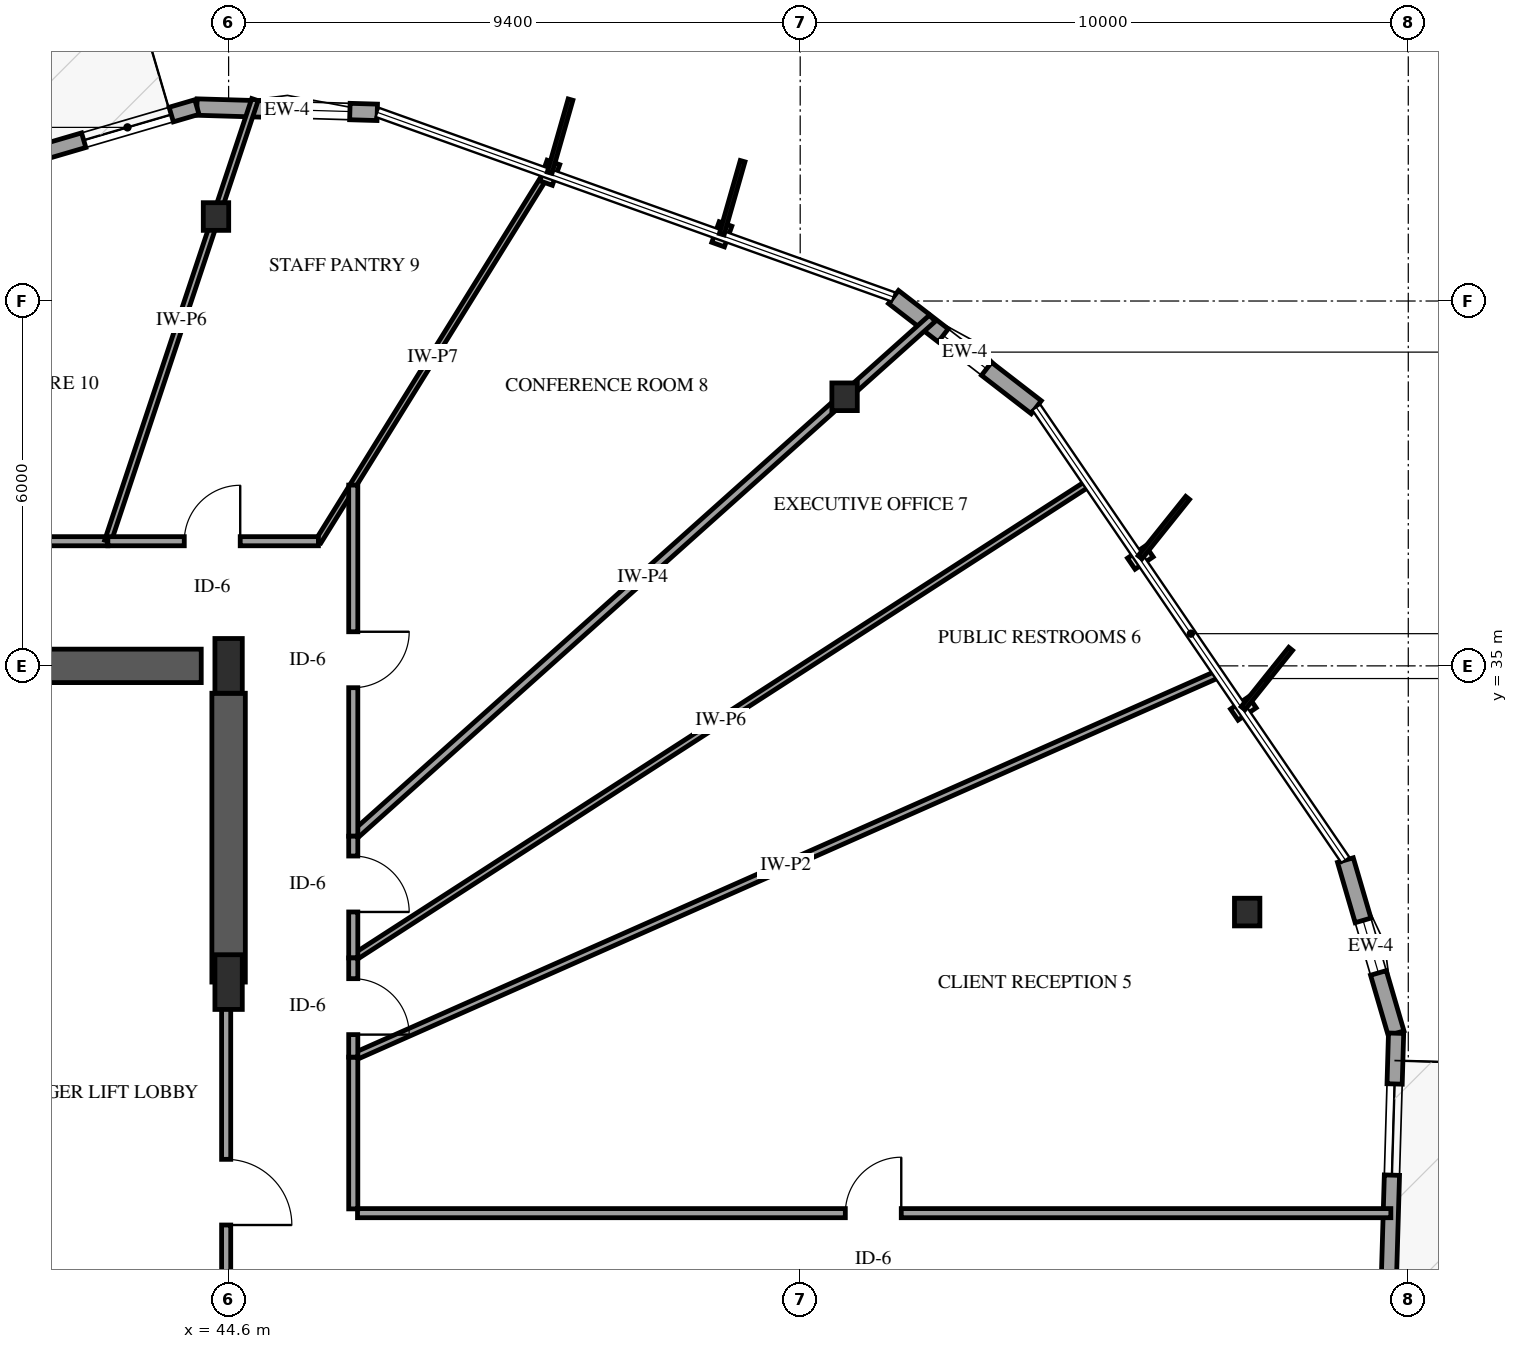
"""IFC4 building model, lengths in metres.
Left out: names, types, materials, properties, quantities, classifications, styles, units other than length and angle.
Written with IfcOpenShell. Run it as: python <this file> out.ifc"""

import sys

from ifc_helpers import new_model, si_unit, direction, frame, frame_2d, origin, origin_2d, place, context, subcontext, project, spatial, rectangle, i_section, extrude, element, fill, save


model = new_model("IFC4")
c1 = context("Model", 3, precision=1e-05, world=origin(), true_north=direction((0.0, 1.0)))
c2 = subcontext(c1, "Body", "Model", "MODEL_VIEW")
j1 = project(units=[si_unit("LENGTHUNIT", "METRE"), si_unit("PLANEANGLEUNIT", "RADIAN")], contexts=[c1])
p1 = place(None, origin())
s1 = spatial("IfcSite", under=j1, at=p1, CompositionType="ELEMENT")
p2 = place(p1, origin())
s2 = spatial("IfcBuilding", under=s1, at=p2, CompositionType="ELEMENT")
p3 = place(p2, frame((0.0, 0.0, 91.3)))
s3 = spatial("IfcBuildingStorey", under=s2, at=p3, CompositionType="ELEMENT", Elevation=91.3)
p4 = place(p3, frame((41.3, 35.0, 0.0), z_axis=(0.0, 0.0, 1.0), x_axis=(1.0, 0.0, 0.0)))
e1 = element("IfcWall", 1, at=p4, inside=s3, PredefinedType="SHEAR", context=c2, shape_type="SweptSolid", body=[
    extrude(rectangle(XDim=2.85, YDim=0.55, at=frame_2d((1.425, 0.0))), origin(), (0.0, 0.0, 1.0), 3.9),
])
p5 = place(p3, frame((44.6, 29.8, 0.0), z_axis=(0.0, 0.0, 1.0), x_axis=(0.0, 1.0, 0.0)))
e2 = element("IfcWall", 2, at=p5, inside=s3, PredefinedType="SHEAR", context=c2, shape_type="SweptSolid", body=[
    extrude(rectangle(XDim=4.75, YDim=0.55, at=frame_2d((2.375, 0.0))), origin(), (0.0, 0.0, 1.0), 3.9),
])
for number, where, z_axis, x_axis in (
    (3, (44.6, 29.8, 0.0), (0.0, 0.0, 1.0), (1.0, 0.0, 0.0)),
    (4, (44.6, 35.0, 0.0), (0.0, 0.0, 1.0), (1.0, 0.0, 0.0)),
):
    element("IfcColumn", number, at=place(p3, frame(where, z_axis=z_axis, x_axis=x_axis)), inside=s3, PredefinedType="PILASTER", context=c2, shape_type="SweptSolid", body=[
        extrude(rectangle(XDim=0.45, YDim=0.9, at=origin_2d()), origin(), (0.0, 0.0, 1.0), 3.9),
    ])
for number, where, z_axis, x_axis in (
    (5, (61.351, 30.951, 0.0), (0.0, 0.0, 1.0), (1.0, 0.0, 0.0)),
    (6, (54.73, 39.425, 0.0), (0.0, 0.0, 1.0), (1.0, 0.0, 0.0)),
    (7, (44.393, 42.389, 0.0), (0.0, 0.0, 1.0), (1.0, 0.0, 0.0)),
):
    element("IfcColumn", number, at=place(p3, frame(where, z_axis=z_axis, x_axis=x_axis)), inside=s3, PredefinedType="COLUMN", context=c2, shape_type="SweptSolid", body=[
        extrude(i_section(OverallWidth=0.418, OverallDepth=0.455, WebThickness=0.042, FlangeThickness=0.068, FilletRadius=0.038, at=origin_2d()), origin(), (0.0, 0.0, 1.0), 3.9),
    ])
p6 = place(p3, frame((57.882, 39.253, 0.0), z_axis=(0.0, 0.0, 1.0), x_axis=(-0.791417099737, 0.611276512098, 0.0)))
e8 = element("IfcWall", 8, at=p6, inside=s3, PredefinedType="SOLIDWALL", context=c2, shape_type="SweptSolid", body=[
    extrude(rectangle(XDim=2.967, YDim=0.27, at=frame_2d((1.483, 0.0))), origin(), (0.0, 0.0, 1.0), 2.979),
])
p7 = place(p6, frame((1.033, 0.0, 0.75)))
e9 = element("IfcOpeningElement", 9, at=p7, cuts=e8, PredefinedType="OPENING", context=c2, shape_type="SweptSolid", body=[
    extrude(rectangle(XDim=0.9, YDim=1.5, at=frame_2d((0.45, 0.75))), frame((0.0, 0.145, 0.0), z_axis=(0.0, -1.0, 0.0), x_axis=(1.0, 0.0, 0.0)), (0.0, 0.0, 1.0), 0.29),
])
p8 = place(p3, frame((47.044, 44.103, 0.0), z_axis=(0.0, 0.0, 1.0), x_axis=(-0.999570736723, 0.029297479193, 0.0)))
e10 = element("IfcWall", 10, at=p8, inside=s3, PredefinedType="SOLIDWALL", context=c2, shape_type="SweptSolid", body=[
    extrude(rectangle(XDim=2.967, YDim=0.27, at=frame_2d((1.483, 0.0))), origin(), (0.0, 0.0, 1.0), 2.979),
])
p9 = place(p8, frame((0.45, 0.0, 0.75)))
e11 = element("IfcOpeningElement", 11, at=p9, cuts=e10, PredefinedType="OPENING", context=c2, shape_type="SweptSolid", body=[
    extrude(rectangle(XDim=0.9, YDim=1.5, at=frame_2d((0.45, 0.75))), frame((0.0, 0.145, 0.0), z_axis=(0.0, -1.0, 0.0), x_axis=(1.0, 0.0, 0.0)), (0.0, 0.0, 1.0), 0.29),
])
p10 = place(p3, frame((44.079, 44.19, 0.0), z_axis=(0.0, 0.0, 1.0), x_axis=(-0.959709272815, -0.28099486058, 0.0)))
e12 = element("IfcWall", 12, at=p10, inside=s3, PredefinedType="SOLIDWALL", context=c2, shape_type="SweptSolid", body=[
    extrude(rectangle(XDim=9.017, YDim=0.25, at=frame_2d((4.508, 0.0))), origin(), (0.0, 0.0, 1.0), 2.979),
])
p11 = place(p10, frame((4.008, 0.0, 0.0)))
e13 = element("IfcOpeningElement", 13, at=p11, cuts=e12, PredefinedType="OPENING", context=c2, shape_type="SweptSolid", body=[
    extrude(rectangle(XDim=1.05, YDim=2.15, at=frame_2d((0.525, 1.075))), frame((0.0, 0.135, 0.0), z_axis=(0.0, -1.0, 0.0), x_axis=(1.0, 0.0, 0.0)), (0.0, 0.0, 1.0), 0.27),
])
p12 = place(p10, frame((0.44, 0.0, 0.72)))
e14 = element("IfcOpeningElement", 14, at=p12, cuts=e12, PredefinedType="OPENING", context=c2, shape_type="SweptSolid", body=[
    extrude(rectangle(XDim=1.5, YDim=1.7, at=frame_2d((0.75, 0.85))), frame((0.0, 0.135, 0.0), z_axis=(0.0, -1.0, 0.0), x_axis=(1.0, 0.0, 0.0)), (0.0, 0.0, 1.0), 0.27),
])
p13 = place(p10, frame((5.698, 0.0, 0.72)))
e15 = element("IfcOpeningElement", 15, at=p13, cuts=e12, PredefinedType="OPENING", context=c2, shape_type="SweptSolid", body=[
    extrude(rectangle(XDim=1.5, YDim=1.7, at=frame_2d((0.75, 0.85))), frame((0.0, 0.135, 0.0), z_axis=(0.0, -1.0, 0.0), x_axis=(1.0, 0.0, 0.0)), (0.0, 0.0, 1.0), 0.27),
])
p14 = place(p3, frame((63.8, 28.959, 0.0), z_axis=(0.0, 0.0, 1.0), x_axis=(-0.280976408638, 0.959714675197, 0.0)))
e16 = element("IfcWall", 16, at=p14, inside=s3, PredefinedType="SOLIDWALL", context=c2, shape_type="SweptSolid", body=[
    extrude(rectangle(XDim=2.966, YDim=0.27, at=frame_2d((1.483, 0.0))), origin(), (0.0, 0.0, 1.0), 2.979),
])
p15 = place(p14, frame((1.033, 0.0, 0.75)))
e17 = element("IfcOpeningElement", 17, at=p15, cuts=e16, PredefinedType="OPENING", context=c2, shape_type="SweptSolid", body=[
    extrude(rectangle(XDim=0.9, YDim=1.5, at=frame_2d((0.45, 0.75))), frame((0.0, 0.145, 0.0), z_axis=(0.0, -1.0, 0.0), x_axis=(1.0, 0.0, 0.0)), (0.0, 0.0, 1.0), 0.29),
])
p16 = place(p3, frame((63.535, 19.946, 0.0), z_axis=(0.0, 0.0, 1.0), x_axis=(0.029323462977, 0.999569974799, 0.0)))
e18 = element("IfcWall", 18, at=p16, inside=s3, PredefinedType="SOLIDWALL", context=c2, shape_type="SweptSolid", body=[
    extrude(rectangle(XDim=9.017, YDim=0.25, at=frame_2d((4.508, 0.0))), origin(), (0.0, 0.0, 1.0), 2.979),
])
p17 = place(p16, frame((0.65, 0.0, 0.0)))
e19 = element("IfcOpeningElement", 19, at=p17, cuts=e18, PredefinedType="OPENING", context=c2, shape_type="SweptSolid", body=[
    extrude(rectangle(XDim=1.05, YDim=2.15, at=frame_2d((0.525, 1.075))), frame((0.0, 0.135, 0.0), z_axis=(0.0, -1.0, 0.0), x_axis=(1.0, 0.0, 0.0)), (0.0, 0.0, 1.0), 0.27),
])
p18 = place(p16, frame((6.682, 0.0, 0.72)))
e20 = element("IfcOpeningElement", 20, at=p18, cuts=e18, PredefinedType="OPENING", context=c2, shape_type="SweptSolid", body=[
    extrude(rectangle(XDim=1.5, YDim=1.7, at=frame_2d((0.75, 0.85))), frame((0.0, 0.135, 0.0), z_axis=(0.0, -1.0, 0.0), x_axis=(1.0, 0.0, 0.0)), (0.0, 0.0, 1.0), 0.27),
])
p19 = place(p3, frame((46.72, 26.0, 0.0), z_axis=(0.0, 0.0, 1.0), x_axis=(1.0, 0.0, 0.0)))
e21 = element("IfcWall", 21, at=p19, inside=s3, PredefinedType="PARTITIONING", context=c2, shape_type="SweptSolid", body=[
    extrude(rectangle(XDim=16.993, YDim=0.15, at=frame_2d((8.497, 0.0))), origin(), (0.0, 0.0, 1.0), 3.6),
])
p20 = place(p19, frame((8.022, 0.0, 0.0)))
e22 = element("IfcOpeningElement", 22, at=p20, cuts=e21, PredefinedType="OPENING", context=c2, shape_type="SweptSolid", body=[
    extrude(rectangle(XDim=0.92, YDim=2.12, at=frame_2d((0.46, 1.06))), frame((0.0, 0.085, 0.0), z_axis=(0.0, -1.0, 0.0), x_axis=(1.0, 0.0, 0.0)), (0.0, 0.0, 1.0), 0.17),
])
p21 = place(p3, frame((46.65, 28.566, 0.0), z_axis=(0.0, 0.0, 1.0), x_axis=(0.91433810275, 0.404951643853, 0.0)))
e23 = element("IfcWall", 23, at=p21, inside=s3, PredefinedType="PARTITIONING", context=c2, shape_type="SweptSolid", body=[
    extrude(rectangle(XDim=15.56, YDim=0.12, at=frame_2d((7.78, 0.0))), origin(), (0.0, 0.0, 1.0), 3.6),
])
p22 = place(p3, frame((46.65, 30.197, 0.0), z_axis=(0.0, 0.0, 1.0), x_axis=(0.840113321111, 0.542410921435, 0.0)))
e24 = element("IfcWall", 24, at=p22, inside=s3, PredefinedType="PARTITIONING", context=c2, shape_type="SweptSolid", body=[
    extrude(rectangle(XDim=14.387, YDim=0.11, at=frame_2d((7.194, 0.0))), origin(), (0.0, 0.0, 1.0), 3.6),
])
p23 = place(p3, frame((46.65, 32.199, 0.0), z_axis=(0.0, 0.0, 1.0), x_axis=(0.745379719691, 0.66664013791, 0.0)))
e25 = element("IfcWall", 25, at=p23, inside=s3, PredefinedType="PARTITIONING", context=c2, shape_type="SweptSolid", body=[
    extrude(rectangle(XDim=12.778, YDim=0.14, at=frame_2d((6.389, 0.0))), origin(), (0.0, 0.0, 1.0), 3.6),
])
p24 = place(p3, frame((34.81, 37.05, 0.0), z_axis=(0.0, 0.0, 1.0), x_axis=(1.0, 0.0, 0.0)))
e26 = element("IfcWall", 26, at=p24, inside=s3, PredefinedType="PARTITIONING", context=c2, shape_type="SweptSolid", body=[
    extrude(rectangle(XDim=7.804, YDim=0.15, at=frame_2d((3.902, 0.0))), origin(), (0.0, 0.0, 1.0), 3.6),
])
p25 = place(p24, frame((3.427, 0.0, 0.0)))
e27 = element("IfcOpeningElement", 27, at=p25, cuts=e26, PredefinedType="OPENING", context=c2, shape_type="SweptSolid", body=[
    extrude(rectangle(XDim=0.92, YDim=2.12, at=frame_2d((0.46, 1.06))), frame((0.0, 0.085, 0.0), z_axis=(0.0, -1.0, 0.0), x_axis=(1.0, 0.0, 0.0)), (0.0, 0.0, 1.0), 0.17),
])
p26 = place(p3, frame((42.614, 37.05, 0.0), z_axis=(0.0, 0.0, 1.0), x_axis=(0.316026813331, 0.948750258633, 0.0)))
e28 = element("IfcWall", 28, at=p26, inside=s3, PredefinedType="PARTITIONING", context=c2, shape_type="SweptSolid", body=[
    extrude(rectangle(XDim=7.654, YDim=0.11, at=frame_2d((3.827, 0.0))), origin(), (0.0, 0.0, 1.0), 2.895),
])
p27 = place(p3, frame((46.077, 37.05, 0.0), z_axis=(0.0, 0.0, 1.0), x_axis=(0.527246015716, 0.849712680211, 0.0)))
e29 = element("IfcWall", 29, at=p27, inside=s3, PredefinedType="PARTITIONING", context=c2, shape_type="SweptSolid", body=[
    extrude(rectangle(XDim=7.126, YDim=0.1, at=frame_2d((3.563, 0.0))), origin(), (0.0, 0.0, 1.0), 3.6),
])
p28 = place(p3, frame((44.56, 29.8, 0.0), z_axis=(0.0, 0.0, 1.0), x_axis=(0.0, -1.0, 0.0)))
e30 = element("IfcWall", 30, at=p28, inside=s3, PredefinedType="PARTITIONING", context=c2, shape_type="SweptSolid", body=[
    extrude(rectangle(XDim=6.91, YDim=0.15, at=frame_2d((3.455, 0.0))), origin(), (0.0, 0.0, 1.0), 2.64),
])
p29 = place(p28, frame((2.915, 0.0, 0.0)))
e31 = element("IfcOpeningElement", 31, at=p29, cuts=e30, PredefinedType="OPENING", context=c2, shape_type="SweptSolid", body=[
    extrude(rectangle(XDim=1.08, YDim=2.15, at=frame_2d((0.54, 1.075))), frame((0.0, 0.085, 0.0), z_axis=(0.0, -1.0, 0.0), x_axis=(1.0, 0.0, 0.0)), (0.0, 0.0, 1.0), 0.17),
])
p30 = place(p3, frame((46.65, 37.973, 0.0), z_axis=(0.0, 0.0, 1.0), x_axis=(0.0, -1.0, 0.0)))
e32 = element("IfcWall", 32, at=p30, inside=s3, PredefinedType="PARTITIONING", context=c2, shape_type="SweptSolid", body=[
    extrude(rectangle(XDim=5.774, YDim=0.15, at=frame_2d((2.887, 0.0))), origin(), (0.0, 0.0, 1.0), 3.6),
])
p31 = place(p30, frame((2.412, 0.0, 0.0)))
e33 = element("IfcOpeningElement", 33, at=p31, cuts=e32, PredefinedType="OPENING", context=c2, shape_type="SweptSolid", body=[
    extrude(rectangle(XDim=0.92, YDim=2.12, at=frame_2d((0.46, 1.06))), frame((0.0, 0.085, 0.0), z_axis=(0.0, -1.0, 0.0), x_axis=(1.0, 0.0, 0.0)), (0.0, 0.0, 1.0), 0.17),
])
p32 = place(p3, frame((42.614, 37.05, 0.0), z_axis=(0.0, 0.0, 1.0), x_axis=(1.0, 0.0, 0.0)))
e34 = element("IfcWall", 34, at=p32, inside=s3, PredefinedType="PARTITIONING", context=c2, shape_type="SweptSolid", body=[
    extrude(rectangle(XDim=3.463, YDim=0.15, at=frame_2d((1.731, 0.0))), origin(), (0.0, 0.0, 1.0), 3.6),
])
p33 = place(p32, frame((1.257, 0.0, 0.0)))
e35 = element("IfcOpeningElement", 35, at=p33, cuts=e34, PredefinedType="OPENING", context=c2, shape_type="SweptSolid", body=[
    extrude(rectangle(XDim=0.92, YDim=2.12, at=frame_2d((0.46, 1.06))), frame((0.0, 0.085, 0.0), z_axis=(0.0, -1.0, 0.0), x_axis=(1.0, 0.0, 0.0)), (0.0, 0.0, 1.0), 0.17),
])
p34 = place(p3, frame((46.65, 28.566, 0.0), z_axis=(0.0, 0.0, 1.0), x_axis=(0.0, -1.0, 0.0)))
e36 = element("IfcWall", 36, at=p34, inside=s3, PredefinedType="PARTITIONING", context=c2, shape_type="SweptSolid", body=[
    extrude(rectangle(XDim=2.496, YDim=0.15, at=frame_2d((1.248, 0.0))), origin(), (0.0, 0.0, 1.0), 3.6),
])
p35 = place(p3, frame((46.65, 32.199, 0.0), z_axis=(0.0, 0.0, 1.0), x_axis=(0.0, -1.0, 0.0)))
e37 = element("IfcWall", 37, at=p35, inside=s3, PredefinedType="PARTITIONING", context=c2, shape_type="SweptSolid", body=[
    extrude(rectangle(XDim=2.002, YDim=0.15, at=frame_2d((1.001, 0.0))), origin(), (0.0, 0.0, 1.0), 3.6),
])
p36 = place(p35, frame((0.326, 0.0, 0.0)))
e38 = element("IfcOpeningElement", 38, at=p36, cuts=e37, PredefinedType="OPENING", context=c2, shape_type="SweptSolid", body=[
    extrude(rectangle(XDim=0.92, YDim=2.12, at=frame_2d((0.46, 1.06))), frame((0.0, 0.085, 0.0), z_axis=(0.0, -1.0, 0.0), x_axis=(1.0, 0.0, 0.0)), (0.0, 0.0, 1.0), 0.17),
])
p37 = place(p3, frame((46.65, 30.197, 0.0), z_axis=(0.0, 0.0, 1.0), x_axis=(0.0, -1.0, 0.0)))
e39 = element("IfcWall", 39, at=p37, inside=s3, PredefinedType="PARTITIONING", context=c2, shape_type="SweptSolid", body=[
    extrude(rectangle(XDim=1.631, YDim=0.15, at=frame_2d((0.815, 0.0))), origin(), (0.0, 0.0, 1.0), 3.6),
])
p38 = place(p37, frame((0.341, 0.0, 0.0)))
e40 = element("IfcOpeningElement", 40, at=p38, cuts=e39, PredefinedType="OPENING", context=c2, shape_type="SweptSolid", body=[
    extrude(rectangle(XDim=0.92, YDim=2.12, at=frame_2d((0.46, 1.06))), frame((0.0, 0.085, 0.0), z_axis=(0.0, -1.0, 0.0), x_axis=(1.0, 0.0, 0.0)), (0.0, 0.0, 1.0), 0.17),
])
p39 = place(p7, origin())
e41 = element("IfcWindow", 41, at=p39, inside=s3, PartitioningType="SINGLE_PANEL", PredefinedType="WINDOW", context=c2, shape_type="SweptSolid", body=[
    extrude(rectangle(XDim=0.9, YDim=1.5, at=frame_2d((0.45, 0.75))), frame((0.0, 0.03, 0.0), z_axis=(0.0, -1.0, 0.0), x_axis=(1.0, 0.0, 0.0)), (0.0, 0.0, 1.0), 0.06),
])
fill(e9, e41)
p40 = place(p9, origin())
e42 = element("IfcWindow", 42, at=p40, inside=s3, PartitioningType="SINGLE_PANEL", PredefinedType="WINDOW", context=c2, shape_type="SweptSolid", body=[
    extrude(rectangle(XDim=0.9, YDim=1.5, at=frame_2d((0.45, 0.75))), frame((0.0, 0.03, 0.0), z_axis=(0.0, -1.0, 0.0), x_axis=(1.0, 0.0, 0.0)), (0.0, 0.0, 1.0), 0.06),
])
fill(e11, e42)
p41 = place(p12, origin())
e43 = element("IfcWindow", 43, at=p41, inside=s3, PartitioningType="SINGLE_PANEL", PredefinedType="WINDOW", context=c2, shape_type="SweptSolid", body=[
    extrude(rectangle(XDim=1.5, YDim=1.7, at=frame_2d((0.75, 0.85))), frame((0.0, 0.03, 0.0), z_axis=(0.0, -1.0, 0.0), x_axis=(1.0, 0.0, 0.0)), (0.0, 0.0, 1.0), 0.06),
])
fill(e14, e43)
p42 = place(p15, origin())
e44 = element("IfcWindow", 44, at=p42, inside=s3, PartitioningType="SINGLE_PANEL", PredefinedType="WINDOW", context=c2, shape_type="SweptSolid", body=[
    extrude(rectangle(XDim=0.9, YDim=1.5, at=frame_2d((0.45, 0.75))), frame((0.0, 0.03, 0.0), z_axis=(0.0, -1.0, 0.0), x_axis=(1.0, 0.0, 0.0)), (0.0, 0.0, 1.0), 0.06),
])
fill(e17, e44)
p43 = place(p18, origin())
e45 = element("IfcWindow", 45, at=p43, inside=s3, PartitioningType="SINGLE_PANEL", PredefinedType="WINDOW", context=c2, shape_type="SweptSolid", body=[
    extrude(rectangle(XDim=1.5, YDim=1.7, at=frame_2d((0.75, 0.85))), frame((0.0, 0.03, 0.0), z_axis=(0.0, -1.0, 0.0), x_axis=(1.0, 0.0, 0.0)), (0.0, 0.0, 1.0), 0.06),
])
fill(e20, e45)
p44 = place(p20, origin())
e46 = element("IfcDoor", 46, at=p44, inside=s3, OperationType="SINGLE_SWING_RIGHT", PredefinedType="DOOR", context=c2, shape_type="SweptSolid", body=[
    extrude(rectangle(XDim=0.92, YDim=2.12, at=frame_2d((0.46, 1.06))), frame((0.0, 0.025, 0.0), z_axis=(0.0, -1.0, 0.0), x_axis=(1.0, 0.0, 0.0)), (0.0, 0.0, 1.0), 0.05),
])
fill(e22, e46)
p45 = place(p29, origin())
e47 = element("IfcDoor", 47, at=p45, inside=s3, OperationType="SINGLE_SWING_RIGHT", PredefinedType="DOOR", context=c2, shape_type="SweptSolid", body=[
    extrude(rectangle(XDim=1.08, YDim=2.15, at=frame_2d((0.54, 1.075))), frame((0.0, 0.025, 0.0), z_axis=(0.0, -1.0, 0.0), x_axis=(1.0, 0.0, 0.0)), (0.0, 0.0, 1.0), 0.05),
])
fill(e31, e47)
p46 = place(p31, origin())
e48 = element("IfcDoor", 48, at=p46, inside=s3, OperationType="SINGLE_SWING_LEFT", PredefinedType="DOOR", context=c2, shape_type="SweptSolid", body=[
    extrude(rectangle(XDim=0.92, YDim=2.12, at=frame_2d((0.46, 1.06))), frame((0.0, 0.025, 0.0), z_axis=(0.0, -1.0, 0.0), x_axis=(1.0, 0.0, 0.0)), (0.0, 0.0, 1.0), 0.05),
])
fill(e33, e48)
p47 = place(p33, origin())
e49 = element("IfcDoor", 49, at=p47, inside=s3, OperationType="SINGLE_SWING_RIGHT", PredefinedType="DOOR", context=c2, shape_type="SweptSolid", body=[
    extrude(rectangle(XDim=0.92, YDim=2.12, at=frame_2d((0.46, 1.06))), frame((0.0, 0.025, 0.0), z_axis=(0.0, -1.0, 0.0), x_axis=(1.0, 0.0, 0.0)), (0.0, 0.0, 1.0), 0.05),
])
fill(e35, e49)
p48 = place(p36, origin())
e50 = element("IfcDoor", 50, at=p48, inside=s3, OperationType="SINGLE_SWING_RIGHT", PredefinedType="DOOR", context=c2, shape_type="SweptSolid", body=[
    extrude(rectangle(XDim=0.92, YDim=2.12, at=frame_2d((0.46, 1.06))), frame((0.0, 0.025, 0.0), z_axis=(0.0, -1.0, 0.0), x_axis=(1.0, 0.0, 0.0)), (0.0, 0.0, 1.0), 0.05),
])
fill(e38, e50)
p49 = place(p38, origin())
e51 = element("IfcDoor", 51, at=p49, inside=s3, OperationType="SINGLE_SWING_RIGHT", PredefinedType="DOOR", context=c2, shape_type="SweptSolid", body=[
    extrude(rectangle(XDim=0.92, YDim=2.12, at=frame_2d((0.46, 1.06))), frame((0.0, 0.025, 0.0), z_axis=(0.0, -1.0, 0.0), x_axis=(1.0, 0.0, 0.0)), (0.0, 0.0, 1.0), 0.05),
])
fill(e40, e51)
save(model, sys.argv[1])
